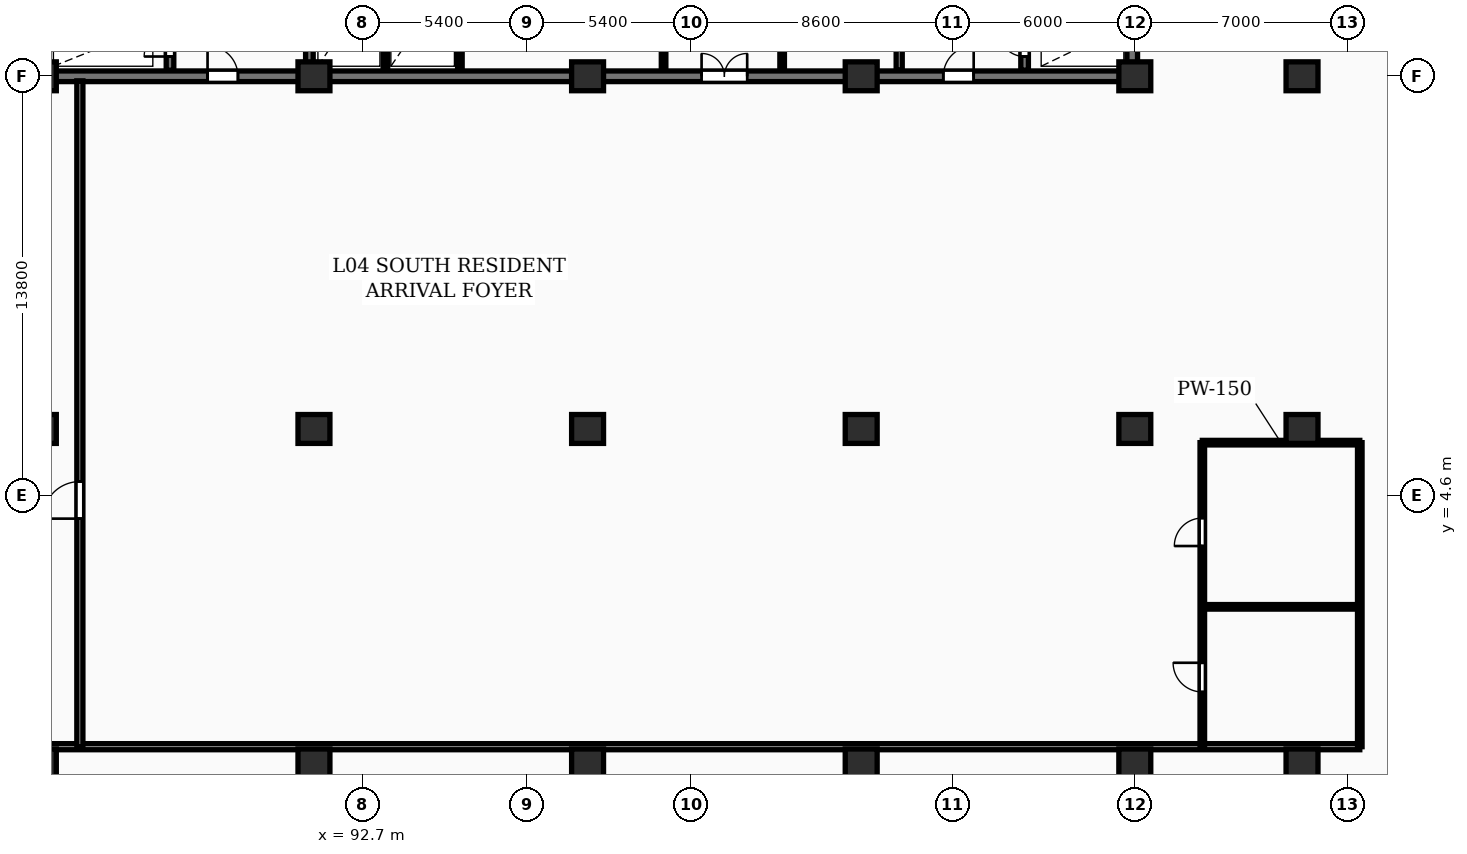
"""IFC4 building model, lengths in metres.
Left out: names, types, materials, properties, quantities, classifications, styles, units other than length and angle.
Written with IfcOpenShell. Run it as: python <this file> out.ifc"""

import sys

from ifc_helpers import new_model, si_unit, direction, frame, frame_2d, origin, origin_2d, place, context, subcontext, project, spatial, rectangle, extrude, element, fill, save


model = new_model("IFC4")
c1 = context("Model", 3, precision=1e-05, world=origin(), true_north=direction((0.0, 1.0)))
c2 = subcontext(c1, "Body", "Model", "MODEL_VIEW")
j1 = project(units=[si_unit("LENGTHUNIT", "METRE"), si_unit("PLANEANGLEUNIT", "RADIAN")], contexts=[c1])
p1 = place(None, origin())
s1 = spatial("IfcSite", under=j1, at=p1, CompositionType="ELEMENT")
p2 = place(p1, origin())
s2 = spatial("IfcBuilding", under=s1, at=p2, CompositionType="ELEMENT")
p3 = place(p2, frame((0.0, 0.0, 19.0)))
s3 = spatial("IfcBuildingStorey", under=s2, at=p3, CompositionType="ELEMENT", Elevation=19.0)
for number, where, z_axis, x_axis in (
    (1, (82.1, -4.2, 0.0), (0.0, 0.0, 1.0), (1.0, 0.0, 0.0)),
    (2, (82.1, 6.8, 0.0), (0.0, 0.0, 1.0), (1.0, 0.0, 0.0)),
    (3, (82.1, 18.4, 0.0), (0.0, 0.0, 1.0), (1.0, 0.0, 0.0)),
    (4, (91.1, -4.2, 0.0), (0.0, 0.0, 1.0), (1.0, 0.0, 0.0)),
    (5, (91.1, 6.8, 0.0), (0.0, 0.0, 1.0), (1.0, 0.0, 0.0)),
    (6, (91.1, 18.4, 0.0), (0.0, 0.0, 1.0), (1.0, 0.0, 0.0)),
    (7, (100.1, -4.2, 0.0), (0.0, 0.0, 1.0), (1.0, 0.0, 0.0)),
    (8, (100.1, 6.8, 0.0), (0.0, 0.0, 1.0), (1.0, 0.0, 0.0)),
    (9, (100.1, 18.4, 0.0), (0.0, 0.0, 1.0), (1.0, 0.0, 0.0)),
    (10, (109.1, -4.2, 0.0), (0.0, 0.0, 1.0), (1.0, 0.0, 0.0)),
    (11, (109.1, 6.8, 0.0), (0.0, 0.0, 1.0), (1.0, 0.0, 0.0)),
    (12, (109.1, 18.4, 0.0), (0.0, 0.0, 1.0), (1.0, 0.0, 0.0)),
    (13, (118.1, -4.2, 0.0), (0.0, 0.0, 1.0), (1.0, 0.0, 0.0)),
    (14, (118.1, 6.8, 0.0), (0.0, 0.0, 1.0), (1.0, 0.0, 0.0)),
    (15, (118.1, 18.4, 0.0), (0.0, 0.0, 1.0), (1.0, 0.0, 0.0)),
    (16, (123.6, -4.2, 0.0), (0.0, 0.0, 1.0), (1.0, 0.0, 0.0)),
    (17, (123.6, 6.8, 0.0), (0.0, 0.0, 1.0), (1.0, 0.0, 0.0)),
    (18, (123.6, 18.4, 0.0), (0.0, 0.0, 1.0), (1.0, 0.0, 0.0)),
):
    element("IfcColumn", number, at=place(p3, frame(where, z_axis=z_axis, x_axis=x_axis)), inside=s3, PredefinedType="COLUMN", context=c2, shape_type="SweptSolid", body=[
        extrude(rectangle(XDim=1.05, YDim=0.95, at=origin_2d()), origin(), (0.0, 0.0, 1.0), 5.0),
    ])
p4 = place(p3, frame((118.015, 18.575, 0.0), z_axis=(0.0, 0.0, 1.0), x_axis=(0.0, 1.0, 0.0)))
e19 = element("IfcWall", 19, at=p4, inside=s3, PredefinedType="SHEAR", context=c2, shape_type="SweptSolid", body=[
    extrude(rectangle(XDim=11.65, YDim=0.35, at=frame_2d((5.825, 0.0))), origin(), (0.0, 0.0, 1.0), 5.0),
])
p5 = place(p3, frame((81.925, 18.4, 0.0), z_axis=(0.0, 0.0, 1.0), x_axis=(1.0, 0.0, 0.0)))
e20 = element("IfcWall", 20, at=p5, inside=s3, PredefinedType="SHEAR", context=c2, shape_type="SweptSolid", body=[
    extrude(rectangle(XDim=36.265, YDim=0.35, at=frame_2d((18.132, 0.0))), origin(), (0.0, 0.0, 1.0), 5.0),
])
p6 = place(p5, frame((5.675, 0.0, 0.0)))
e21 = element("IfcOpeningElement", 21, at=p6, cuts=e20, PredefinedType="OPENING", context=c2, shape_type="SweptSolid", body=[
    extrude(rectangle(XDim=1.0, YDim=2.15, at=frame_2d((0.5, 1.075))), frame((0.0, 0.185, 0.0), z_axis=(0.0, -1.0, 0.0), x_axis=(1.0, 0.0, 0.0)), (0.0, 0.0, 1.0), 0.37),
])
p7 = place(p5, frame((21.925, 0.0, 0.0)))
e22 = element("IfcOpeningElement", 22, at=p7, cuts=e20, PredefinedType="OPENING", context=c2, shape_type="SweptSolid", body=[
    extrude(rectangle(XDim=1.5, YDim=2.2, at=frame_2d((0.75, 1.1))), frame((0.0, 0.185, 0.0), z_axis=(0.0, -1.0, 0.0), x_axis=(1.0, 0.0, 0.0)), (0.0, 0.0, 1.0), 0.37),
])
p8 = place(p5, frame((29.875, 0.0, 0.0)))
e23 = element("IfcOpeningElement", 23, at=p8, cuts=e20, PredefinedType="OPENING", context=c2, shape_type="SweptSolid", body=[
    extrude(rectangle(XDim=1.0, YDim=2.15, at=frame_2d((0.5, 1.075))), frame((0.0, 0.185, 0.0), z_axis=(0.0, -1.0, 0.0), x_axis=(1.0, 0.0, 0.0)), (0.0, 0.0, 1.0), 0.37),
])
p9 = place(p3, frame((86.365, 18.6, 0.0), z_axis=(0.0, 0.0, 1.0), x_axis=(0.0, 1.0, 0.0)))
e24 = element("IfcWall", 24, at=p9, inside=s3, PredefinedType="SHEAR", context=c2, shape_type="SweptSolid", body=[
    extrude(rectangle(XDim=11.6, YDim=0.25, at=frame_2d((5.8, 0.0))), origin(), (0.0, 0.0, 1.0), 5.0),
])
p10 = place(p9, frame((0.45, 0.0, 0.0)))
e25 = element("IfcOpeningElement", 25, at=p10, cuts=e24, PredefinedType="OPENING", context=c2, shape_type="SweptSolid", body=[
    extrude(rectangle(XDim=0.85, YDim=2.05, at=frame_2d((0.425, 1.025))), frame((0.0, 0.135, 0.0), z_axis=(0.0, -1.0, 0.0), x_axis=(1.0, 0.0, 0.0)), (0.0, 0.0, 1.0), 0.27),
])
p11 = place(p9, frame((2.05, 0.0, 0.0)))
e26 = element("IfcOpeningElement", 26, at=p11, cuts=e24, PredefinedType="OPENING", context=c2, shape_type="SweptSolid", body=[
    extrude(rectangle(XDim=1.1, YDim=2.1, at=frame_2d((0.55, 1.05))), frame((0.0, 0.135, 0.0), z_axis=(0.0, -1.0, 0.0), x_axis=(1.0, 0.0, 0.0)), (0.0, 0.0, 1.0), 0.27),
])
p12 = place(p9, frame((9.95, 0.0, 0.0)))
e27 = element("IfcOpeningElement", 27, at=p12, cuts=e24, PredefinedType="OPENING", context=c2, shape_type="SweptSolid", body=[
    extrude(rectangle(XDim=0.85, YDim=2.05, at=frame_2d((0.425, 1.025))), frame((0.0, 0.135, 0.0), z_axis=(0.0, -1.0, 0.0), x_axis=(1.0, 0.0, 0.0)), (0.0, 0.0, 1.0), 0.27),
])
p13 = place(p3, frame((90.95, 18.6, 0.0), z_axis=(0.0, 0.0, 1.0), x_axis=(0.0, 1.0, 0.0)))
e28 = element("IfcWall", 28, at=p13, inside=s3, PredefinedType="SHEAR", context=c2, shape_type="SweptSolid", body=[
    extrude(rectangle(XDim=11.6, YDim=0.25, at=frame_2d((5.8, 0.0))), origin(), (0.0, 0.0, 1.0), 5.0),
])
p14 = place(p13, frame((4.6, 0.0, 0.0)))
e29 = element("IfcOpeningElement", 29, at=p14, cuts=e28, PredefinedType="OPENING", context=c2, shape_type="SweptSolid", body=[
    extrude(rectangle(XDim=1.1, YDim=2.1, at=frame_2d((0.55, 1.05))), frame((0.0, 0.135, 0.0), z_axis=(0.0, -1.0, 0.0), x_axis=(1.0, 0.0, 0.0)), (0.0, 0.0, 1.0), 0.27),
])
for number, where, z_axis, x_axis in (
    (30, (93.45, 18.6, 0.0), (0.0, 0.0, 1.0), (0.0, 1.0, 0.0)),
    (31, (95.9, 18.6, 0.0), (0.0, 0.0, 1.0), (0.0, 1.0, 0.0)),
    (32, (102.6, 18.6, 0.0), (0.0, 0.0, 1.0), (0.0, 1.0, 0.0)),
    (33, (106.5, 18.6, 0.0), (0.0, 0.0, 1.0), (0.0, 1.0, 0.0)),
):
    element("IfcWall", number, at=place(p3, frame(where, z_axis=z_axis, x_axis=x_axis)), inside=s3, PredefinedType="PARTITIONING", context=c2, shape_type="SweptSolid", body=[
        extrude(rectangle(XDim=3.6, YDim=0.15, at=frame_2d((1.8, 0.0))), origin(), (0.0, 0.0, 1.0), 4.68),
    ])
p15 = place(p3, frame((110.35, 18.6, 0.0), z_axis=(0.0, 0.0, 1.0), x_axis=(0.0, 1.0, 0.0)))
e34 = element("IfcWall", 34, at=p15, inside=s3, PredefinedType="PARTITIONING", context=c2, shape_type="SweptSolid", body=[
    extrude(rectangle(XDim=11.6, YDim=0.2, at=frame_2d((5.8, 0.0))), origin(), (0.0, 0.0, 1.0), 4.68),
])
p16 = place(p15, frame((5.2, 0.0, 0.0)))
e35 = element("IfcOpeningElement", 35, at=p16, cuts=e34, PredefinedType="OPENING", context=c2, shape_type="SweptSolid", body=[
    extrude(rectangle(XDim=1.1, YDim=2.15, at=frame_2d((0.55, 1.075))), frame((0.0, 0.11, 0.0), z_axis=(0.0, -1.0, 0.0), x_axis=(1.0, 0.0, 0.0)), (0.0, 0.0, 1.0), 0.22),
])
p17 = place(p3, frame((114.475, 18.6, 0.0), z_axis=(0.0, 0.0, 1.0), x_axis=(0.0, 1.0, 0.0)))
e36 = element("IfcWall", 36, at=p17, inside=s3, PredefinedType="SHEAR", context=c2, shape_type="SweptSolid", body=[
    extrude(rectangle(XDim=11.6, YDim=0.25, at=frame_2d((5.8, 0.0))), origin(), (0.0, 0.0, 1.0), 5.0),
])
p18 = place(p17, frame((0.45, 0.0, 0.0)))
e37 = element("IfcOpeningElement", 37, at=p18, cuts=e36, PredefinedType="OPENING", context=c2, shape_type="SweptSolid", body=[
    extrude(rectangle(XDim=0.85, YDim=2.05, at=frame_2d((0.425, 1.025))), frame((0.0, 0.135, 0.0), z_axis=(0.0, -1.0, 0.0), x_axis=(1.0, 0.0, 0.0)), (0.0, 0.0, 1.0), 0.27),
])
p19 = place(p17, frame((2.05, 0.0, 0.0)))
e38 = element("IfcOpeningElement", 38, at=p19, cuts=e36, PredefinedType="OPENING", context=c2, shape_type="SweptSolid", body=[
    extrude(rectangle(XDim=1.1, YDim=2.1, at=frame_2d((0.55, 1.05))), frame((0.0, 0.135, 0.0), z_axis=(0.0, -1.0, 0.0), x_axis=(1.0, 0.0, 0.0)), (0.0, 0.0, 1.0), 0.27),
])
p20 = place(p17, frame((9.95, 0.0, 0.0)))
e39 = element("IfcOpeningElement", 39, at=p20, cuts=e36, PredefinedType="OPENING", context=c2, shape_type="SweptSolid", body=[
    extrude(rectangle(XDim=0.85, YDim=2.05, at=frame_2d((0.425, 1.025))), frame((0.0, 0.135, 0.0), z_axis=(0.0, -1.0, 0.0), x_axis=(1.0, 0.0, 0.0)), (0.0, 0.0, 1.0), 0.27),
])
p21 = place(p3, frame((65.2, -3.65, 0.0), z_axis=(0.0, 0.0, 1.0), x_axis=(1.0, 0.0, 0.0)))
e40 = element("IfcWall", 40, at=p21, inside=s3, PredefinedType="PARTITIONING", context=c2, shape_type="SweptSolid", body=[
    extrude(rectangle(XDim=60.3, YDim=0.2, at=frame_2d((30.15, 0.0))), origin(), (0.0, 0.0, 1.0), 3.53),
])
p22 = place(p3, frame((83.4, -3.65, 0.0), z_axis=(0.0, 0.0, 1.0), x_axis=(0.0, 1.0, 0.0)))
e41 = element("IfcWall", 41, at=p22, inside=s3, PredefinedType="PARTITIONING", context=c2, shape_type="SweptSolid", body=[
    extrude(rectangle(XDim=21.9, YDim=0.2, at=frame_2d((10.95, 0.0))), origin(), (0.0, 0.0, 1.0), 4.68),
])
p23 = place(p22, frame((7.501, 0.0, 0.0)))
e42 = element("IfcOpeningElement", 42, at=p23, cuts=e41, PredefinedType="OPENING", context=c2, shape_type="SweptSolid", body=[
    extrude(rectangle(XDim=1.22, YDim=2.18, at=frame_2d((0.61, 1.09))), frame((0.0, 0.11, 0.0), z_axis=(0.0, -1.0, 0.0), x_axis=(1.0, 0.0, 0.0)), (0.0, 0.0, 1.0), 0.22),
])
p24 = place(p3, frame((120.32, -3.65, 0.0), z_axis=(0.0, 0.0, 1.0), x_axis=(0.0, 1.0, 0.0)))
e43 = element("IfcWall", 43, at=p24, inside=s3, PredefinedType="PARTITIONING", context=c2, shape_type="SweptSolid", body=[
    extrude(rectangle(XDim=10.0, YDim=0.15, at=frame_2d((5.0, 0.0))), origin(), (0.0, 0.0, 1.0), 4.68),
])
p25 = place(p24, frame((1.8, 0.0, 0.0)))
e44 = element("IfcOpeningElement", 44, at=p25, cuts=e43, PredefinedType="OPENING", context=c2, shape_type="SweptSolid", body=[
    extrude(rectangle(XDim=0.96, YDim=2.1, at=frame_2d((0.48, 1.05))), frame((0.0, 0.085, 0.0), z_axis=(0.0, -1.0, 0.0), x_axis=(1.0, 0.0, 0.0)), (0.0, 0.0, 1.0), 0.17),
])
p26 = place(p24, frame((6.6, 0.0, 0.0)))
e45 = element("IfcOpeningElement", 45, at=p26, cuts=e43, PredefinedType="OPENING", context=c2, shape_type="SweptSolid", body=[
    extrude(rectangle(XDim=0.92, YDim=2.08, at=frame_2d((0.46, 1.04))), frame((0.0, 0.085, 0.0), z_axis=(0.0, -1.0, 0.0), x_axis=(1.0, 0.0, 0.0)), (0.0, 0.0, 1.0), 0.17),
])
p27 = place(p3, frame((120.32, 0.95, 0.0), z_axis=(0.0, 0.0, 1.0), x_axis=(1.0, 0.0, 0.0)))
e46 = element("IfcWall", 46, at=p27, inside=s3, PredefinedType="PARTITIONING", context=c2, shape_type="SweptSolid", body=[
    extrude(rectangle(XDim=5.18, YDim=0.15, at=frame_2d((2.59, 0.0))), origin(), (0.0, 0.0, 1.0), 4.68),
])
p28 = place(p3, frame((120.32, 6.35, 0.0), z_axis=(0.0, 0.0, 1.0), x_axis=(1.0, 0.0, 0.0)))
e47 = element("IfcWall", 47, at=p28, inside=s3, PredefinedType="PARTITIONING", context=c2, shape_type="SweptSolid", body=[
    extrude(rectangle(XDim=5.18, YDim=0.15, at=frame_2d((2.59, 0.0))), origin(), (0.0, 0.0, 1.0), 3.53),
])
p29 = place(p3, frame((125.5, -3.65, 0.0), z_axis=(0.0, 0.0, 1.0), x_axis=(0.0, 1.0, 0.0)))
e48 = element("IfcWall", 48, at=p29, inside=s3, PredefinedType="PARTITIONING", context=c2, shape_type="SweptSolid", body=[
    extrude(rectangle(XDim=10.0, YDim=0.15, at=frame_2d((5.0, 0.0))), origin(), (0.0, 0.0, 1.0), 4.68),
])
p30 = place(p6, origin())
e49 = element("IfcDoor", 49, at=p30, inside=s3, OperationType="SINGLE_SWING_LEFT", PredefinedType="DOOR", context=c2, shape_type="SweptSolid", body=[
    extrude(rectangle(XDim=1.0, YDim=2.15, at=frame_2d((0.5, 1.075))), frame((0.0, 0.025, 0.0), z_axis=(0.0, -1.0, 0.0), x_axis=(1.0, 0.0, 0.0)), (0.0, 0.0, 1.0), 0.05),
])
fill(e21, e49)
p31 = place(p7, origin())
e50 = element("IfcDoor", 50, at=p31, inside=s3, OperationType="DOUBLE_DOOR_SINGLE_SWING", PredefinedType="DOOR", context=c2, shape_type="SweptSolid", body=[
    extrude(rectangle(XDim=1.5, YDim=2.2, at=frame_2d((0.75, 1.1))), frame((0.0, 0.025, 0.0), z_axis=(0.0, -1.0, 0.0), x_axis=(1.0, 0.0, 0.0)), (0.0, 0.0, 1.0), 0.05),
])
fill(e22, e50)
p32 = place(p8, origin())
e51 = element("IfcDoor", 51, at=p32, inside=s3, OperationType="SINGLE_SWING_RIGHT", PredefinedType="DOOR", context=c2, shape_type="SweptSolid", body=[
    extrude(rectangle(XDim=1.0, YDim=2.15, at=frame_2d((0.5, 1.075))), frame((0.0, 0.025, 0.0), z_axis=(0.0, -1.0, 0.0), x_axis=(1.0, 0.0, 0.0)), (0.0, 0.0, 1.0), 0.05),
])
fill(e23, e51)
p33 = place(p10, origin())
e52 = element("IfcDoor", 52, at=p33, inside=s3, OperationType="SINGLE_SWING_LEFT", PredefinedType="DOOR", context=c2, shape_type="SweptSolid", body=[
    extrude(rectangle(XDim=0.85, YDim=2.05, at=frame_2d((0.425, 1.025))), frame((0.0, 0.025, 0.0), z_axis=(0.0, -1.0, 0.0), x_axis=(1.0, 0.0, 0.0)), (0.0, 0.0, 1.0), 0.05),
])
fill(e25, e52)
p34 = place(p18, origin())
e53 = element("IfcDoor", 53, at=p34, inside=s3, OperationType="SINGLE_SWING_RIGHT", PredefinedType="DOOR", context=c2, shape_type="SweptSolid", body=[
    extrude(rectangle(XDim=0.85, YDim=2.05, at=frame_2d((0.425, 1.025))), frame((0.0, 0.025, 0.0), z_axis=(0.0, -1.0, 0.0), x_axis=(1.0, 0.0, 0.0)), (0.0, 0.0, 1.0), 0.05),
])
fill(e37, e53)
p35 = place(p23, origin())
e54 = element("IfcDoor", 54, at=p35, inside=s3, OperationType="SINGLE_SWING_LEFT", PredefinedType="DOOR", context=c2, shape_type="SweptSolid", body=[
    extrude(rectangle(XDim=1.22, YDim=2.18, at=frame_2d((0.61, 1.09))), frame((0.0, 0.025, 0.0), z_axis=(0.0, -1.0, 0.0), x_axis=(1.0, 0.0, 0.0)), (0.0, 0.0, 1.0), 0.05),
])
fill(e42, e54)
p36 = place(p25, origin())
e55 = element("IfcDoor", 55, at=p36, inside=s3, OperationType="SINGLE_SWING_RIGHT", PredefinedType="DOOR", context=c2, shape_type="SweptSolid", body=[
    extrude(rectangle(XDim=0.96, YDim=2.1, at=frame_2d((0.48, 1.05))), frame((0.0, 0.025, 0.0), z_axis=(0.0, -1.0, 0.0), x_axis=(1.0, 0.0, 0.0)), (0.0, 0.0, 1.0), 0.05),
])
fill(e44, e55)
p37 = place(p26, origin())
e56 = element("IfcDoor", 56, at=p37, inside=s3, OperationType="SINGLE_SWING_LEFT", PredefinedType="DOOR", context=c2, shape_type="SweptSolid", body=[
    extrude(rectangle(XDim=0.92, YDim=2.08, at=frame_2d((0.46, 1.04))), frame((0.0, 0.025, 0.0), z_axis=(0.0, -1.0, 0.0), x_axis=(1.0, 0.0, 0.0)), (0.0, 0.0, 1.0), 0.05),
])
fill(e45, e56)
save(model, sys.argv[1])
